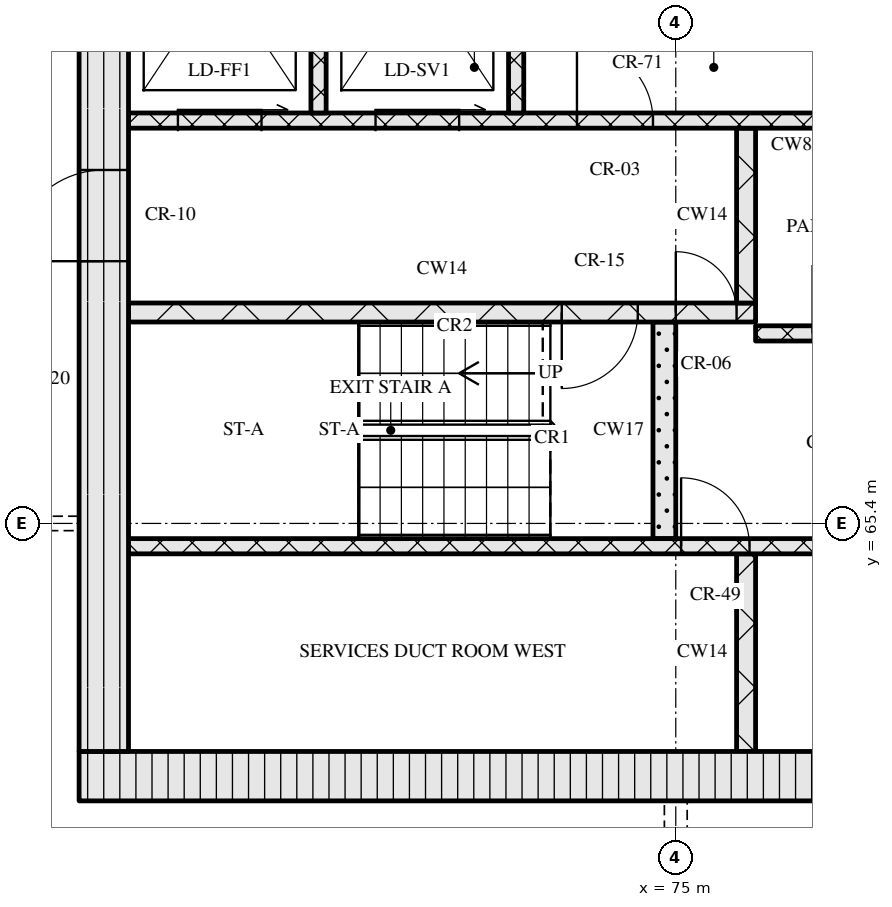
"""IFC4 building model, lengths in metres.
Left out: names, types, materials, properties, quantities, classifications, styles, units other than length and angle.
Written with IfcOpenShell. Run it as: python <this file> out.ifc"""

import sys

from ifc_helpers import new_model, si_unit, direction, frame, frame_2d, origin, place, context, subcontext, project, spatial, rectangle, extrude, element, fill, save


model = new_model("IFC4")
c1 = context("Model", 3, precision=1e-05, world=origin(), true_north=direction((0.0, 1.0)))
c2 = subcontext(c1, "Body", "Model", "MODEL_VIEW")
j1 = project(units=[si_unit("LENGTHUNIT", "METRE"), si_unit("PLANEANGLEUNIT", "RADIAN")], contexts=[c1])
p1 = place(None, origin())
s1 = spatial("IfcSite", under=j1, at=p1, CompositionType="ELEMENT")
p2 = place(p1, origin())
s2 = spatial("IfcBuilding", under=s1, at=p2, CompositionType="ELEMENT")
p3 = place(p2, frame((0.0, 0.0, 241.5)))
s3 = spatial("IfcBuildingStorey", under=s2, at=p3, CompositionType="ELEMENT", Elevation=241.5)
p4 = place(p3, frame((67.15, 62.075, 0.0), z_axis=(0.0, 0.0, 1.0), x_axis=(1.0, 0.0, 0.0)))
e1 = element("IfcWall", 1, at=p4, inside=s3, PredefinedType="SOLIDWALL", context=c2, shape_type="SweptSolid", body=[
    extrude(rectangle(XDim=40.9, YDim=0.65, at=frame_2d((20.45, 0.0))), origin(), (0.0, 0.0, 1.0), 3.32),
])
p5 = place(p4, frame((20.8, 0.0, 0.0)))
e2 = element("IfcOpeningElement", 2, at=p5, cuts=e1, PredefinedType="OPENING", context=c2, shape_type="SweptSolid", body=[
    extrude(rectangle(XDim=1.8, YDim=2.1, at=frame_2d((0.9, 1.05))), frame((0.0, 0.335, 0.0), z_axis=(0.0, -1.0, 0.0), x_axis=(1.0, 0.0, 0.0)), (0.0, 0.0, 1.0), 0.67),
])
p6 = place(p3, frame((67.475, 62.4, 0.0), z_axis=(0.0, 0.0, 1.0), x_axis=(0.0, 1.0, 0.0)))
e3 = element("IfcWall", 3, at=p6, inside=s3, PredefinedType="SOLIDWALL", context=c2, shape_type="SweptSolid", body=[
    extrude(rectangle(XDim=12.0, YDim=0.65, at=frame_2d((6.0, 0.0))), origin(), (0.0, 0.0, 1.0), 3.32),
])
p7 = place(p6, frame((6.45, 0.0, 0.0)))
e4 = element("IfcOpeningElement", 4, at=p7, cuts=e3, PredefinedType="OPENING", context=c2, shape_type="SweptSolid", body=[
    extrude(rectangle(XDim=1.2, YDim=2.1, at=frame_2d((0.6, 1.05))), frame((0.0, 0.335, 0.0), z_axis=(0.0, -1.0, 0.0), x_axis=(1.0, 0.0, 0.0)), (0.0, 0.0, 1.0), 0.67),
])
p8 = place(p3, frame((75.925, 62.4, 0.0), z_axis=(0.0, 0.0, 1.0), x_axis=(0.0, 1.0, 0.0)))
e5 = element("IfcWall", 5, at=p8, inside=s3, PredefinedType="SOLIDWALL", context=c2, shape_type="SweptSolid", body=[
    extrude(rectangle(XDim=2.6, YDim=0.25, at=frame_2d((1.3, 0.0))), origin(), (0.0, 0.0, 1.0), 3.32),
])
p9 = place(p3, frame((67.8, 65.1, 0.0), z_axis=(0.0, 0.0, 1.0), x_axis=(1.0, 0.0, 0.0)))
e6 = element("IfcWall", 6, at=p9, inside=s3, PredefinedType="SOLIDWALL", context=c2, shape_type="SweptSolid", body=[
    extrude(rectangle(XDim=18.5, YDim=0.2, at=frame_2d((9.25, 0.0))), origin(), (0.0, 0.0, 1.0), 3.32),
])
p10 = place(p9, frame((7.27, 0.0, 0.0)))
e7 = element("IfcOpeningElement", 7, at=p10, cuts=e6, PredefinedType="OPENING", context=c2, shape_type="SweptSolid", body=[
    extrude(rectangle(XDim=0.9, YDim=2.1, at=frame_2d((0.45, 1.05))), frame((0.0, 0.11, 0.0), z_axis=(0.0, -1.0, 0.0), x_axis=(1.0, 0.0, 0.0)), (0.0, 0.0, 1.0), 0.22),
])
p11 = place(p9, frame((9.65, 0.0, 0.0)))
e8 = element("IfcOpeningElement", 8, at=p11, cuts=e6, PredefinedType="OPENING", context=c2, shape_type="SweptSolid", body=[
    extrude(rectangle(XDim=0.9, YDim=2.1, at=frame_2d((0.45, 1.05))), frame((0.0, 0.11, 0.0), z_axis=(0.0, -1.0, 0.0), x_axis=(1.0, 0.0, 0.0)), (0.0, 0.0, 1.0), 0.22),
])
p12 = place(p9, frame((13.36, 0.0, 0.0)))
e9 = element("IfcOpeningElement", 9, at=p12, cuts=e6, PredefinedType="OPENING", context=c2, shape_type="SweptSolid", body=[
    extrude(rectangle(XDim=0.9, YDim=2.1, at=frame_2d((0.45, 1.05))), frame((0.0, 0.11, 0.0), z_axis=(0.0, -1.0, 0.0), x_axis=(1.0, 0.0, 0.0)), (0.0, 0.0, 1.0), 0.22),
])
p13 = place(p9, frame((16.7, 0.0, 0.0)))
e10 = element("IfcOpeningElement", 10, at=p13, cuts=e6, PredefinedType="OPENING", context=c2, shape_type="SweptSolid", body=[
    extrude(rectangle(XDim=0.9, YDim=2.1, at=frame_2d((0.45, 1.05))), frame((0.0, 0.11, 0.0), z_axis=(0.0, -1.0, 0.0), x_axis=(1.0, 0.0, 0.0)), (0.0, 0.0, 1.0), 0.22),
])
p14 = place(p3, frame((74.85, 65.2, 0.0), z_axis=(0.0, 0.0, 1.0), x_axis=(0.0, 1.0, 0.0)))
e11 = element("IfcWall", 11, at=p14, inside=s3, PredefinedType="SOLIDWALL", context=c2, shape_type="SweptSolid", body=[
    extrude(rectangle(XDim=2.85, YDim=0.3, at=frame_2d((1.425, 0.0))), origin(), (0.0, 0.0, 1.0), 3.32),
])
p15 = place(p3, frame((76.05, 67.9, 0.0), z_axis=(0.0, 0.0, 1.0), x_axis=(1.0, 0.0, 0.0)))
e12 = element("IfcWall", 12, at=p15, inside=s3, PredefinedType="SOLIDWALL", context=c2, shape_type="SweptSolid", body=[
    extrude(rectangle(XDim=23.1, YDim=0.2, at=frame_2d((11.55, 0.0))), origin(), (0.0, 0.0, 1.0), 3.32),
])
p16 = place(p15, frame((0.75, 0.0, 0.0)))
e13 = element("IfcOpeningElement", 13, at=p16, cuts=e12, PredefinedType="OPENING", context=c2, shape_type="SweptSolid", body=[
    extrude(rectangle(XDim=0.9, YDim=2.1, at=frame_2d((0.45, 1.05))), frame((0.0, 0.11, 0.0), z_axis=(0.0, -1.0, 0.0), x_axis=(1.0, 0.0, 0.0)), (0.0, 0.0, 1.0), 0.22),
])
p17 = place(p15, frame((3.32, 0.0, 0.0)))
e14 = element("IfcOpeningElement", 14, at=p17, cuts=e12, PredefinedType="OPENING", context=c2, shape_type="SweptSolid", body=[
    extrude(rectangle(XDim=0.9, YDim=2.1, at=frame_2d((0.45, 1.05))), frame((0.0, 0.11, 0.0), z_axis=(0.0, -1.0, 0.0), x_axis=(1.0, 0.0, 0.0)), (0.0, 0.0, 1.0), 0.22),
])
p18 = place(p15, frame((5.77, 0.0, 0.0)))
e15 = element("IfcOpeningElement", 15, at=p18, cuts=e12, PredefinedType="OPENING", context=c2, shape_type="SweptSolid", body=[
    extrude(rectangle(XDim=0.9, YDim=2.1, at=frame_2d((0.45, 1.05))), frame((0.0, 0.11, 0.0), z_axis=(0.0, -1.0, 0.0), x_axis=(1.0, 0.0, 0.0)), (0.0, 0.0, 1.0), 0.22),
])
p19 = place(p15, frame((8.45, 0.0, 0.0)))
e16 = element("IfcOpeningElement", 16, at=p19, cuts=e12, PredefinedType="OPENING", context=c2, shape_type="SweptSolid", body=[
    extrude(rectangle(XDim=0.9, YDim=2.1, at=frame_2d((0.45, 1.05))), frame((0.0, 0.11, 0.0), z_axis=(0.0, -1.0, 0.0), x_axis=(1.0, 0.0, 0.0)), (0.0, 0.0, 1.0), 0.22),
])
p20 = place(p15, frame((10.91, 0.0, 0.0)))
e17 = element("IfcOpeningElement", 17, at=p20, cuts=e12, PredefinedType="OPENING", context=c2, shape_type="SweptSolid", body=[
    extrude(rectangle(XDim=0.9, YDim=2.1, at=frame_2d((0.45, 1.05))), frame((0.0, 0.11, 0.0), z_axis=(0.0, -1.0, 0.0), x_axis=(1.0, 0.0, 0.0)), (0.0, 0.0, 1.0), 0.22),
])
p21 = place(p15, frame((13.55, 0.0, 0.0)))
e18 = element("IfcOpeningElement", 18, at=p21, cuts=e12, PredefinedType="OPENING", context=c2, shape_type="SweptSolid", body=[
    extrude(rectangle(XDim=1.0, YDim=2.1, at=frame_2d((0.5, 1.05))), frame((0.0, 0.11, 0.0), z_axis=(0.0, -1.0, 0.0), x_axis=(1.0, 0.0, 0.0)), (0.0, 0.0, 1.0), 0.22),
])
p22 = place(p15, frame((16.2, 0.0, 0.0)))
e19 = element("IfcOpeningElement", 19, at=p22, cuts=e12, PredefinedType="OPENING", context=c2, shape_type="SweptSolid", body=[
    extrude(rectangle(XDim=1.1, YDim=2.1, at=frame_2d((0.55, 1.05))), frame((0.0, 0.11, 0.0), z_axis=(0.0, -1.0, 0.0), x_axis=(1.0, 0.0, 0.0)), (0.0, 0.0, 1.0), 0.22),
])
p23 = place(p15, frame((18.7, 0.0, 0.0)))
e20 = element("IfcOpeningElement", 20, at=p23, cuts=e12, PredefinedType="OPENING", context=c2, shape_type="SweptSolid", body=[
    extrude(rectangle(XDim=1.1, YDim=2.1, at=frame_2d((0.55, 1.05))), frame((0.0, 0.11, 0.0), z_axis=(0.0, -1.0, 0.0), x_axis=(1.0, 0.0, 0.0)), (0.0, 0.0, 1.0), 0.22),
])
p24 = place(p15, frame((21.2, 0.0, 0.0)))
e21 = element("IfcOpeningElement", 21, at=p24, cuts=e12, PredefinedType="OPENING", context=c2, shape_type="SweptSolid", body=[
    extrude(rectangle(XDim=1.1, YDim=2.1, at=frame_2d((0.55, 1.05))), frame((0.0, 0.11, 0.0), z_axis=(0.0, -1.0, 0.0), x_axis=(1.0, 0.0, 0.0)), (0.0, 0.0, 1.0), 0.22),
])
p25 = place(p3, frame((67.8, 68.175, 0.0), z_axis=(0.0, 0.0, 1.0), x_axis=(1.0, 0.0, 0.0)))
e22 = element("IfcWall", 22, at=p25, inside=s3, PredefinedType="SOLIDWALL", context=c2, shape_type="SweptSolid", body=[
    extrude(rectangle(XDim=8.25, YDim=0.25, at=frame_2d((4.125, 0.0))), origin(), (0.0, 0.0, 1.0), 3.32),
])
p26 = place(p25, frame((5.7, 0.0, 0.0)))
e23 = element("IfcOpeningElement", 23, at=p26, cuts=e22, PredefinedType="OPENING", context=c2, shape_type="SweptSolid", body=[
    extrude(rectangle(XDim=1.0, YDim=2.1, at=frame_2d((0.5, 1.05))), frame((0.0, 0.135, 0.0), z_axis=(0.0, -1.0, 0.0), x_axis=(1.0, 0.0, 0.0)), (0.0, 0.0, 1.0), 0.27),
])
p27 = place(p25, frame((7.2, 0.0, 0.0)))
e24 = element("IfcOpeningElement", 24, at=p27, cuts=e22, PredefinedType="OPENING", context=c2, shape_type="SweptSolid", body=[
    extrude(rectangle(XDim=0.8, YDim=2.1, at=frame_2d((0.4, 1.05))), frame((0.0, 0.135, 0.0), z_axis=(0.0, -1.0, 0.0), x_axis=(1.0, 0.0, 0.0)), (0.0, 0.0, 1.0), 0.27),
])
p28 = place(p3, frame((75.925, 68.3, 0.0), z_axis=(0.0, 0.0, 1.0), x_axis=(0.0, 1.0, 0.0)))
e25 = element("IfcWall", 25, at=p28, inside=s3, PredefinedType="SOLIDWALL", context=c2, shape_type="SweptSolid", body=[
    extrude(rectangle(XDim=2.3, YDim=0.25, at=frame_2d((1.15, 0.0))), origin(), (0.0, 0.0, 1.0), 3.32),
])
p29 = place(p3, frame((67.8, 70.7, 0.0), z_axis=(0.0, 0.0, 1.0), x_axis=(1.0, 0.0, 0.0)))
e26 = element("IfcWall", 26, at=p29, inside=s3, PredefinedType="SOLIDWALL", context=c2, shape_type="SweptSolid", body=[
    extrude(rectangle(XDim=39.6, YDim=0.2, at=frame_2d((19.8, 0.0))), origin(), (0.0, 0.0, 1.0), 3.32),
])
p30 = place(p29, frame((0.65, 0.0, 0.0)))
e27 = element("IfcOpeningElement", 27, at=p30, cuts=e26, PredefinedType="OPENING", context=c2, shape_type="SweptSolid", body=[
    extrude(rectangle(XDim=1.1, YDim=2.1, at=frame_2d((0.55, 1.05))), frame((0.0, 0.11, 0.0), z_axis=(0.0, -1.0, 0.0), x_axis=(1.0, 0.0, 0.0)), (0.0, 0.0, 1.0), 0.22),
])
p31 = place(p29, frame((3.25, 0.0, 0.0)))
e28 = element("IfcOpeningElement", 28, at=p31, cuts=e26, PredefinedType="OPENING", context=c2, shape_type="SweptSolid", body=[
    extrude(rectangle(XDim=1.1, YDim=2.1, at=frame_2d((0.55, 1.05))), frame((0.0, 0.11, 0.0), z_axis=(0.0, -1.0, 0.0), x_axis=(1.0, 0.0, 0.0)), (0.0, 0.0, 1.0), 0.22),
])
p32 = place(p29, frame((5.9, 0.0, 0.0)))
e29 = element("IfcOpeningElement", 29, at=p32, cuts=e26, PredefinedType="OPENING", context=c2, shape_type="SweptSolid", body=[
    extrude(rectangle(XDim=1.0, YDim=2.1, at=frame_2d((0.5, 1.05))), frame((0.0, 0.11, 0.0), z_axis=(0.0, -1.0, 0.0), x_axis=(1.0, 0.0, 0.0)), (0.0, 0.0, 1.0), 0.22),
])
p33 = place(p29, frame((21.7, 0.0, 0.0)))
e30 = element("IfcOpeningElement", 30, at=p33, cuts=e26, PredefinedType="OPENING", context=c2, shape_type="SweptSolid", body=[
    extrude(rectangle(XDim=1.0, YDim=2.1, at=frame_2d((0.5, 1.05))), frame((0.0, 0.11, 0.0), z_axis=(0.0, -1.0, 0.0), x_axis=(1.0, 0.0, 0.0)), (0.0, 0.0, 1.0), 0.22),
])
p34 = place(p29, frame((32.7, 0.0, 0.0)))
e31 = element("IfcOpeningElement", 31, at=p34, cuts=e26, PredefinedType="OPENING", context=c2, shape_type="SweptSolid", body=[
    extrude(rectangle(XDim=1.0, YDim=2.1, at=frame_2d((0.5, 1.05))), frame((0.0, 0.11, 0.0), z_axis=(0.0, -1.0, 0.0), x_axis=(1.0, 0.0, 0.0)), (0.0, 0.0, 1.0), 0.22),
])
p35 = place(p29, frame((35.25, 0.0, 0.0)))
e32 = element("IfcOpeningElement", 32, at=p35, cuts=e26, PredefinedType="OPENING", context=c2, shape_type="SweptSolid", body=[
    extrude(rectangle(XDim=1.1, YDim=2.1, at=frame_2d((0.55, 1.05))), frame((0.0, 0.11, 0.0), z_axis=(0.0, -1.0, 0.0), x_axis=(1.0, 0.0, 0.0)), (0.0, 0.0, 1.0), 0.22),
])
p36 = place(p29, frame((37.85, 0.0, 0.0)))
e33 = element("IfcOpeningElement", 33, at=p36, cuts=e26, PredefinedType="OPENING", context=c2, shape_type="SweptSolid", body=[
    extrude(rectangle(XDim=1.1, YDim=2.1, at=frame_2d((0.55, 1.05))), frame((0.0, 0.11, 0.0), z_axis=(0.0, -1.0, 0.0), x_axis=(1.0, 0.0, 0.0)), (0.0, 0.0, 1.0), 0.22),
])
p37 = place(p3, frame((70.3, 70.8, 0.0), z_axis=(0.0, 0.0, 1.0), x_axis=(0.0, 1.0, 0.0)))
e34 = element("IfcWall", 34, at=p37, inside=s3, PredefinedType="SOLIDWALL", context=c2, shape_type="SweptSolid", body=[
    extrude(rectangle(XDim=3.6, YDim=0.2, at=frame_2d((1.8, 0.0))), origin(), (0.0, 0.0, 1.0), 3.32),
])
p38 = place(p3, frame((72.9, 70.8, 0.0), z_axis=(0.0, 0.0, 1.0), x_axis=(0.0, 1.0, 0.0)))
e35 = element("IfcWall", 35, at=p38, inside=s3, PredefinedType="SOLIDWALL", context=c2, shape_type="SweptSolid", body=[
    extrude(rectangle(XDim=1.2, YDim=0.2, at=frame_2d((0.6, 0.0))), origin(), (0.0, 0.0, 1.0), 3.32),
])
p39 = place(p10, origin())
e36 = element("IfcDoor", 36, at=p39, inside=s3, OperationType="SINGLE_SWING_LEFT", PredefinedType="DOOR", context=c2, shape_type="SweptSolid", body=[
    extrude(rectangle(XDim=0.9, YDim=2.1, at=frame_2d((0.45, 1.05))), frame((0.0, 0.025, 0.0), z_axis=(0.0, -1.0, 0.0), x_axis=(1.0, 0.0, 0.0)), (0.0, 0.0, 1.0), 0.05),
])
fill(e7, e36)
p40 = place(p26, origin())
e37 = element("IfcDoor", 37, at=p40, inside=s3, OperationType="SINGLE_SWING_RIGHT", PredefinedType="DOOR", context=c2, shape_type="SweptSolid", body=[
    extrude(rectangle(XDim=1.0, YDim=2.1, at=frame_2d((0.5, 1.05))), frame((0.0, 0.025, 0.0), z_axis=(0.0, -1.0, 0.0), x_axis=(1.0, 0.0, 0.0)), (0.0, 0.0, 1.0), 0.05),
])
fill(e23, e37)
p41 = place(p27, origin())
e38 = element("IfcDoor", 38, at=p41, inside=s3, OperationType="SINGLE_SWING_LEFT", PredefinedType="DOOR", context=c2, shape_type="SweptSolid", body=[
    extrude(rectangle(XDim=0.8, YDim=2.1, at=frame_2d((0.4, 1.05))), frame((0.0, 0.025, 0.0), z_axis=(0.0, -1.0, 0.0), x_axis=(1.0, 0.0, 0.0)), (0.0, 0.0, 1.0), 0.05),
])
fill(e24, e38)
p42 = place(p7, origin())
e39 = element("IfcDoor", 39, at=p42, inside=s3, OperationType="SINGLE_SWING_LEFT", PredefinedType="DOOR", context=c2, shape_type="SweptSolid", body=[
    extrude(rectangle(XDim=1.2, YDim=2.1, at=frame_2d((0.6, 1.05))), frame((0.0, 0.025, 0.0), z_axis=(0.0, -1.0, 0.0), x_axis=(1.0, 0.0, 0.0)), (0.0, 0.0, 1.0), 0.05),
])
fill(e4, e39)
p43 = place(p30, origin())
e40 = element("IfcDoor", 40, at=p43, inside=s3, OperationType="SLIDING_TO_RIGHT", PredefinedType="DOOR", context=c2, shape_type="SweptSolid", body=[
    extrude(rectangle(XDim=1.1, YDim=2.1, at=frame_2d((0.55, 1.05))), frame((0.0, 0.025, 0.0), z_axis=(0.0, -1.0, 0.0), x_axis=(1.0, 0.0, 0.0)), (0.0, 0.0, 1.0), 0.05),
])
fill(e27, e40)
p44 = place(p31, origin())
e41 = element("IfcDoor", 41, at=p44, inside=s3, OperationType="SLIDING_TO_RIGHT", PredefinedType="DOOR", context=c2, shape_type="SweptSolid", body=[
    extrude(rectangle(XDim=1.1, YDim=2.1, at=frame_2d((0.55, 1.05))), frame((0.0, 0.025, 0.0), z_axis=(0.0, -1.0, 0.0), x_axis=(1.0, 0.0, 0.0)), (0.0, 0.0, 1.0), 0.05),
])
fill(e28, e41)
p45 = place(p32, origin())
e42 = element("IfcDoor", 42, at=p45, inside=s3, OperationType="SINGLE_SWING_LEFT", PredefinedType="DOOR", context=c2, shape_type="SweptSolid", body=[
    extrude(rectangle(XDim=1.0, YDim=2.1, at=frame_2d((0.5, 1.05))), frame((0.0, 0.025, 0.0), z_axis=(0.0, -1.0, 0.0), x_axis=(1.0, 0.0, 0.0)), (0.0, 0.0, 1.0), 0.05),
])
fill(e29, e42)
save(model, sys.argv[1])
